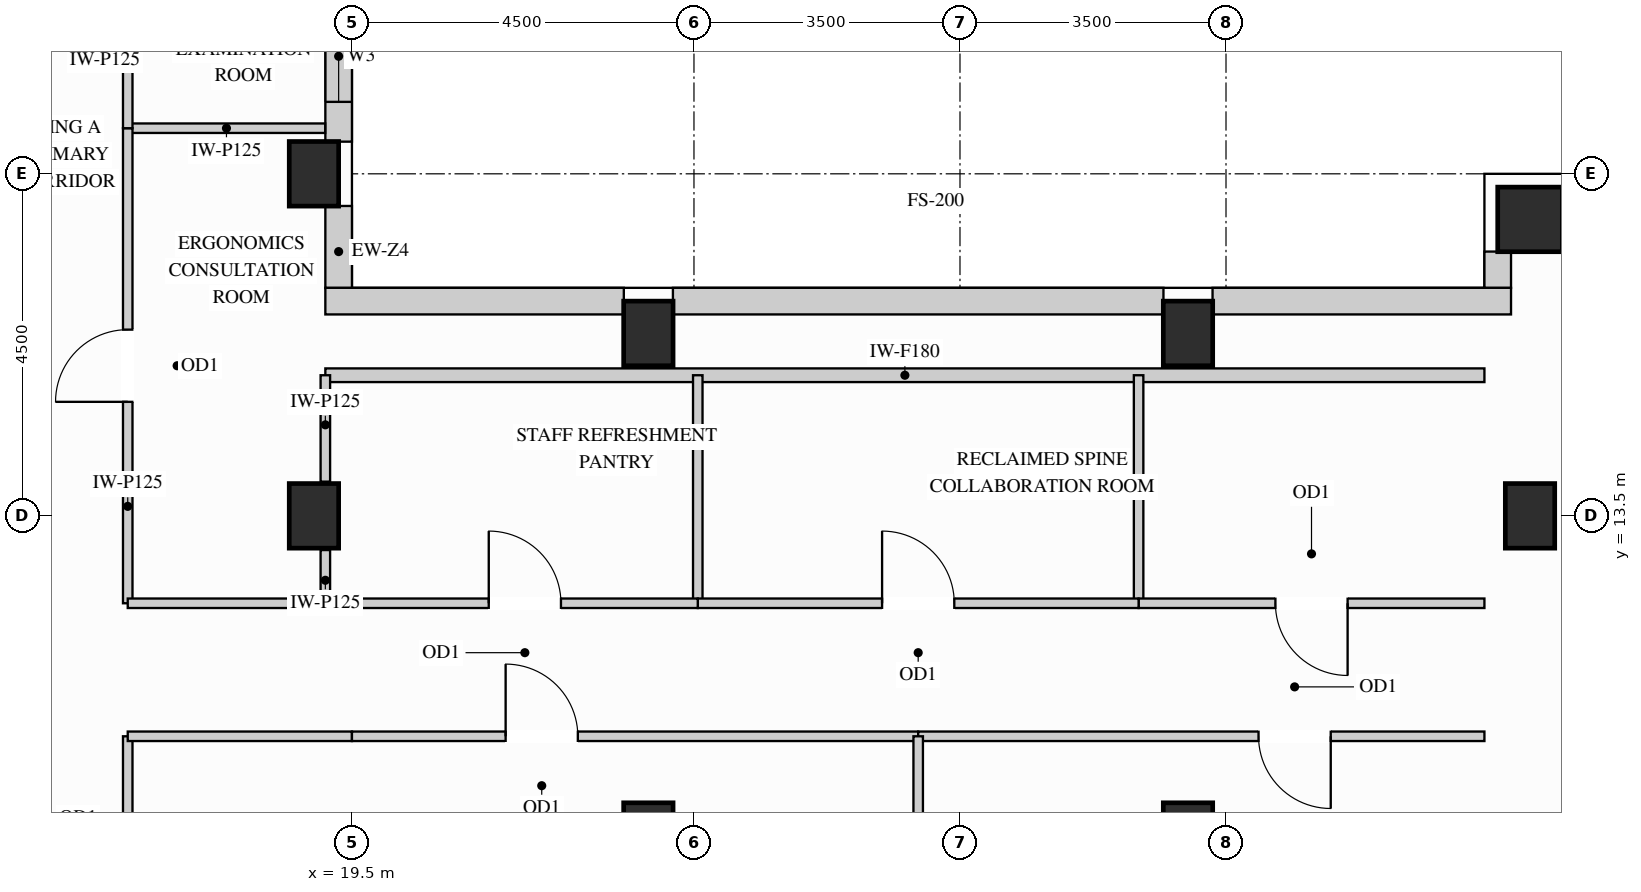
"""IFC4 building model, lengths in metres.
Left out: names, types, materials, properties, quantities, classifications, styles, units other than length and angle.
Written with IfcOpenShell. Run it as: python <this file> out.ifc"""

import sys

from ifc_helpers import new_model, si_unit, direction, frame, frame_2d, origin, origin_2d, place, context, subcontext, project, spatial, rectangle, extrude, source, transform, mapped, element, fill, save


model = new_model("IFC4")
c1 = context("Model", 3, precision=1e-05, world=origin(), true_north=direction((0.0, 1.0)))
c2 = subcontext(c1, "Body", "Model", "MODEL_VIEW")
j1 = project(units=[si_unit("LENGTHUNIT", "METRE"), si_unit("PLANEANGLEUNIT", "RADIAN")], contexts=[c1])
p1 = place(None, origin())
s1 = spatial("IfcSite", under=j1, at=p1, CompositionType="ELEMENT")
p2 = place(p1, origin())
s2 = spatial("IfcBuilding", under=s1, at=p2, CompositionType="ELEMENT")
p3 = place(p2, frame((0.0, 0.0, 248.4)))
s3 = spatial("IfcBuildingStorey", under=s2, at=p3, CompositionType="ELEMENT", Elevation=248.4)
m1 = source(origin(), c2, "Body", "SweptSolid", [
    extrude(rectangle(XDim=0.65, YDim=0.85, at=origin_2d()), origin(), (0.0, 0.0, 1.0), 3.4),
])
for number, where, z_axis, x_axis in (
    (1, (19.0, 13.5, 0.0), (0.0, 0.0, 1.0), (1.0, 0.0, 0.0)),
    (2, (19.0, 18.0, 0.0), (0.0, 0.0, 1.0), (1.0, 0.0, 0.0)),
    (3, (35.0, 13.5, 0.0), (0.0, 0.0, 1.0), (1.0, 0.0, 0.0)),
    (4, (23.4, 15.9, 0.0), (0.0, 0.0, 1.0), (1.0, 0.0, 0.0)),
    (5, (23.4, 9.3, 0.0), (0.0, 0.0, 1.0), (1.0, 0.0, 0.0)),
    (6, (30.5, 15.9, 0.0), (0.0, 0.0, 1.0), (1.0, 0.0, 0.0)),
    (7, (30.5, 9.3, 0.0), (0.0, 0.0, 1.0), (1.0, 0.0, 0.0)),
):
    element("IfcColumn", number, at=place(p3, frame(where, z_axis=z_axis, x_axis=x_axis)), inside=s3, PredefinedType="COLUMN", context=c2, shape_type="MappedRepresentation", body=[
        mapped(m1, transform((0.0, 0.0, 0.0), x_axis=(1.0, 0.0, 0.0), y_axis=(0.0, 1.0, 0.0), z_axis=(0.0, 0.0, 1.0))),
    ])
m2 = source(origin(), c2, "Body", "SweptSolid", [
    extrude(rectangle(XDim=0.85, YDim=0.85, at=origin_2d()), origin(), (0.0, 0.0, 1.0), 3.4),
])
p4 = place(p3, frame((35.0, 17.4, 0.0), z_axis=(0.0, 0.0, 1.0), x_axis=(1.0, 0.0, 0.0)))
e8 = element("IfcColumn", 8, at=p4, inside=s3, PredefinedType="COLUMN", context=c2, shape_type="MappedRepresentation", body=[
    mapped(m2, transform((0.0, 0.0, 0.0), x_axis=(1.0, 0.0, 0.0), y_axis=(0.0, 1.0, 0.0), z_axis=(0.0, 0.0, 1.0))),
])
m3 = source(origin(), c2, "Body", "SweptSolid", [
    extrude(rectangle(XDim=1.079, YDim=0.35, at=frame_2d((0.54, 0.0))), origin(), (0.0, 0.0, 1.0), 2.619),
])
p5 = place(p3, frame((19.325, 16.498, 0.0), z_axis=(0.0, 0.0, 1.0), x_axis=(0.0, 1.0, 0.0)))
e9 = element("IfcWall", 9, at=p5, inside=s3, PredefinedType="SOLIDWALL", context=c2, shape_type="MappedRepresentation", body=[
    mapped(m3, transform((0.0, 0.0, 0.0), x_axis=(1.0, 0.0, 0.0), y_axis=(0.0, 1.0, 0.0), z_axis=(0.0, 0.0, 1.0))),
])
p6 = place(p3, frame((19.325, 18.423, 0.0), z_axis=(0.0, 0.0, 1.0), x_axis=(0.0, 1.0, 0.0)))
e10 = element("IfcWall", 10, at=p6, inside=s3, PredefinedType="SOLIDWALL", context=c2, shape_type="SweptSolid", body=[
    extrude(rectangle(XDim=3.654, YDim=0.35, at=frame_2d((1.827, 0.0))), origin(), (0.0, 0.0, 1.0), 2.619),
])
p7 = place(p6, frame((0.523, 0.0, 0.78)))
e11 = element("IfcOpeningElement", 11, at=p7, cuts=e10, PredefinedType="OPENING", context=c2, shape_type="SweptSolid", body=[
    extrude(rectangle(XDim=1.2, YDim=1.659, at=frame_2d((0.6, 0.83))), frame((0.0, 0.185, 0.0), z_axis=(0.0, -1.0, 0.0), x_axis=(1.0, 0.0, 0.0)), (0.0, 0.0, 1.0), 0.37),
])
m4 = source(origin(), c2, "Body", "SweptSolid", [
    extrude(rectangle(XDim=0.479, YDim=0.35, at=frame_2d((0.24, 0.0))), origin(), (0.0, 0.0, 1.0), 3.385),
])
p8 = place(p3, frame((34.575, 16.977, 0.0), z_axis=(0.0, 0.0, 1.0), x_axis=(0.0, -1.0, 0.0)))
e12 = element("IfcWall", 12, at=p8, inside=s3, PredefinedType="SOLIDWALL", context=c2, shape_type="MappedRepresentation", body=[
    mapped(m4, transform((0.0, 0.0, 0.0), x_axis=(1.0, 0.0, 0.0), y_axis=(0.0, 1.0, 0.0), z_axis=(0.0, 0.0, 1.0))),
])
m5 = source(origin(), c2, "Body", "SweptSolid", [
    extrude(rectangle(XDim=3.927, YDim=0.35, at=frame_2d((1.963, 0.0))), origin(), (0.0, 0.0, 1.0), 3.385),
])
p9 = place(p3, frame((34.75, 16.325, 0.0), z_axis=(0.0, 0.0, 1.0), x_axis=(-1.0, 0.0, 0.0)))
e13 = element("IfcWall", 13, at=p9, inside=s3, PredefinedType="SOLIDWALL", context=c2, shape_type="MappedRepresentation", body=[
    mapped(m5, transform((0.0, 0.0, 0.0), x_axis=(1.0, 0.0, 0.0), y_axis=(0.0, 1.0, 0.0), z_axis=(0.0, 0.0, 1.0))),
])
m6 = source(origin(), c2, "Body", "SweptSolid", [
    extrude(rectangle(XDim=6.454, YDim=0.35, at=frame_2d((3.227, 0.0))), origin(), (0.0, 0.0, 1.0), 3.385),
])
p10 = place(p3, frame((30.177, 16.325, 0.0), z_axis=(0.0, 0.0, 1.0), x_axis=(-1.0, 0.0, 0.0)))
e14 = element("IfcWall", 14, at=p10, inside=s3, PredefinedType="SOLIDWALL", context=c2, shape_type="MappedRepresentation", body=[
    mapped(m6, transform((0.0, 0.0, 0.0), x_axis=(1.0, 0.0, 0.0), y_axis=(0.0, 1.0, 0.0), z_axis=(0.0, 0.0, 1.0))),
])
p11 = place(p3, frame((23.077, 16.325, 0.0), z_axis=(0.0, 0.0, 1.0), x_axis=(-1.0, 0.0, 0.0)))
e15 = element("IfcWall", 15, at=p11, inside=s3, PredefinedType="SOLIDWALL", context=c2, shape_type="MappedRepresentation", body=[
    mapped(m5, transform((0.0, 0.0, 0.0), x_axis=(1.0, 0.0, 0.0), y_axis=(0.0, 1.0, 0.0), z_axis=(0.0, 0.0, 1.0))),
])
m7 = source(origin(), c2, "Body", "SweptSolid", [
    extrude(rectangle(XDim=15.25, YDim=0.18, at=frame_2d((7.625, 0.0))), origin(), (0.0, 0.0, 1.0), 3.385),
])
p12 = place(p3, frame((19.15, 15.35, 0.0), z_axis=(0.0, 0.0, 1.0), x_axis=(1.0, 0.0, 0.0)))
e16 = element("IfcWall", 16, at=p12, inside=s3, PredefinedType="PARTITIONING", context=c2, shape_type="MappedRepresentation", body=[
    mapped(m7, transform((0.0, 0.0, 0.0), x_axis=(1.0, 0.0, 0.0), y_axis=(0.0, 1.0, 0.0), z_axis=(0.0, 0.0, 1.0))),
])
m8 = source(origin(), c2, "Body", "SweptSolid", [
    extrude(rectangle(XDim=2.598, YDim=0.125, at=frame_2d((1.299, 0.0))), origin(), (0.0, 0.0, 1.0), 3.385),
])
p13 = place(p3, frame((16.55, 18.6, 0.0), z_axis=(0.0, 0.0, 1.0), x_axis=(1.0, 0.0, 0.0)))
e17 = element("IfcWall", 17, at=p13, inside=s3, PredefinedType="PARTITIONING", context=c2, shape_type="MappedRepresentation", body=[
    mapped(m8, transform((0.0, 0.0, 0.0), x_axis=(1.0, 0.0, 0.0), y_axis=(0.0, 1.0, 0.0), z_axis=(0.0, 0.0, 1.0))),
])
m9 = source(origin(), c2, "Body", "SweptSolid", [
    extrude(rectangle(XDim=0.7, YDim=0.125, at=frame_2d((0.35, 0.0))), origin(), (0.0, 0.0, 1.0), 2.773),
])
p14 = place(p3, frame((19.15, 12.35, 0.0), z_axis=(0.0, 0.0, 1.0), x_axis=(0.0, 1.0, 0.0)))
e18 = element("IfcWall", 18, at=p14, inside=s3, PredefinedType="PARTITIONING", context=c2, shape_type="MappedRepresentation", body=[
    mapped(m9, transform((0.0, 0.0, 0.0), x_axis=(1.0, 0.0, 0.0), y_axis=(0.0, 1.0, 0.0), z_axis=(0.0, 0.0, 1.0))),
])
m10 = source(origin(), c2, "Body", "SweptSolid", [
    extrude(rectangle(XDim=1.4, YDim=0.125, at=frame_2d((0.7, 0.0))), origin(), (0.0, 0.0, 1.0), 2.619),
])
p15 = place(p3, frame((19.15, 13.95, 0.0), z_axis=(0.0, 0.0, 1.0), x_axis=(0.0, 1.0, 0.0)))
e19 = element("IfcWall", 19, at=p15, inside=s3, PredefinedType="PARTITIONING", context=c2, shape_type="MappedRepresentation", body=[
    mapped(m10, transform((0.0, 0.0, 0.0), x_axis=(1.0, 0.0, 0.0), y_axis=(0.0, 1.0, 0.0), z_axis=(0.0, 0.0, 1.0))),
])
p16 = place(p3, frame((16.55, 12.35, 0.0), z_axis=(0.0, 0.0, 1.0), x_axis=(0.0, 1.0, 0.0)))
e20 = element("IfcWall", 20, at=p16, inside=s3, PredefinedType="PARTITIONING", context=c2, shape_type="SweptSolid", body=[
    extrude(rectangle(XDim=6.25, YDim=0.125, at=frame_2d((3.125, 0.0))), origin(), (0.0, 0.0, 1.0), 3.385),
])
p17 = place(p16, frame((2.65, 0.0, 0.0)))
e21 = element("IfcOpeningElement", 21, at=p17, cuts=e20, PredefinedType="OPENING", context=c2, shape_type="SweptSolid", body=[
    extrude(rectangle(XDim=0.95, YDim=2.15, at=frame_2d((0.475, 1.075))), frame((0.0, 0.073, 0.0), z_axis=(0.0, -1.0, 0.0), x_axis=(1.0, 0.0, 0.0)), (0.0, 0.0, 1.0), 0.145),
])
p18 = place(p3, frame((16.55, 18.6, 0.0), z_axis=(0.0, 0.0, 1.0), x_axis=(0.0, 1.0, 0.0)))
e22 = element("IfcWall", 22, at=p18, inside=s3, PredefinedType="PARTITIONING", context=c2, shape_type="SweptSolid", body=[
    extrude(rectangle(XDim=4.75, YDim=0.125, at=frame_2d((2.375, 0.0))), origin(), (0.0, 0.0, 1.0), 3.385),
])
p19 = place(p18, frame((1.9, 0.0, 0.0)))
e23 = element("IfcOpeningElement", 23, at=p19, cuts=e22, PredefinedType="OPENING", context=c2, shape_type="SweptSolid", body=[
    extrude(rectangle(XDim=0.95, YDim=2.15, at=frame_2d((0.475, 1.075))), frame((0.0, 0.073, 0.0), z_axis=(0.0, -1.0, 0.0), x_axis=(1.0, 0.0, 0.0)), (0.0, 0.0, 1.0), 0.145),
])
p20 = place(p3, frame((16.55, 6.25, 0.0), z_axis=(0.0, 0.0, 1.0), x_axis=(0.0, 1.0, 0.0)))
e24 = element("IfcWall", 24, at=p20, inside=s3, PredefinedType="PARTITIONING", context=c2, shape_type="SweptSolid", body=[
    extrude(rectangle(XDim=4.35, YDim=0.125, at=frame_2d((2.175, 0.0))), origin(), (0.0, 0.0, 1.0), 3.385),
])
p21 = place(p20, frame((1.7, 0.0, 0.0)))
e25 = element("IfcOpeningElement", 25, at=p21, cuts=e24, PredefinedType="OPENING", context=c2, shape_type="SweptSolid", body=[
    extrude(rectangle(XDim=0.95, YDim=2.15, at=frame_2d((0.475, 1.075))), frame((0.0, 0.073, 0.0), z_axis=(0.0, -1.0, 0.0), x_axis=(1.0, 0.0, 0.0)), (0.0, 0.0, 1.0), 0.145),
])
m11 = source(origin(), c2, "Body", "SweptSolid", [
    extrude(rectangle(XDim=3.0, YDim=0.125, at=frame_2d((1.5, 0.0))), origin(), (0.0, 0.0, 1.0), 3.385),
])
for number, where, z_axis, x_axis in (
    (26, (24.05, 12.35, 0.0), (0.0, 0.0, 1.0), (0.0, 1.0, 0.0)),
    (27, (29.85, 12.35, 0.0), (0.0, 0.0, 1.0), (0.0, 1.0, 0.0)),
):
    element("IfcWall", number, at=place(p3, frame(where, z_axis=z_axis, x_axis=x_axis)), inside=s3, PredefinedType="PARTITIONING", context=c2, shape_type="MappedRepresentation", body=[
        mapped(m11, transform((0.0, 0.0, 0.0), x_axis=(1.0, 0.0, 0.0), y_axis=(0.0, 1.0, 0.0), z_axis=(0.0, 0.0, 1.0))),
    ])
p22 = place(p3, frame((29.85, 12.35, 0.0), z_axis=(0.0, 0.0, 1.0), x_axis=(1.0, 0.0, 0.0)))
e28 = element("IfcWall", 28, at=p22, inside=s3, PredefinedType="PARTITIONING", context=c2, shape_type="SweptSolid", body=[
    extrude(rectangle(XDim=4.55, YDim=0.125, at=frame_2d((2.275, 0.0))), origin(), (0.0, 0.0, 1.0), 3.385),
])
p23 = place(p22, frame((1.8, 0.0, 0.0)))
e29 = element("IfcOpeningElement", 29, at=p23, cuts=e28, PredefinedType="OPENING", context=c2, shape_type="SweptSolid", body=[
    extrude(rectangle(XDim=0.95, YDim=2.15, at=frame_2d((0.475, 1.075))), frame((0.0, 0.073, 0.0), z_axis=(0.0, -1.0, 0.0), x_axis=(1.0, 0.0, 0.0)), (0.0, 0.0, 1.0), 0.145),
])
p24 = place(p3, frame((24.05, 12.35, 0.0), z_axis=(0.0, 0.0, 1.0), x_axis=(1.0, 0.0, 0.0)))
e30 = element("IfcWall", 30, at=p24, inside=s3, PredefinedType="PARTITIONING", context=c2, shape_type="SweptSolid", body=[
    extrude(rectangle(XDim=5.8, YDim=0.125, at=frame_2d((2.9, 0.0))), origin(), (0.0, 0.0, 1.0), 3.385),
])
p25 = place(p24, frame((2.425, 0.0, 0.0)))
e31 = element("IfcOpeningElement", 31, at=p25, cuts=e30, PredefinedType="OPENING", context=c2, shape_type="SweptSolid", body=[
    extrude(rectangle(XDim=0.95, YDim=2.15, at=frame_2d((0.475, 1.075))), frame((0.0, 0.073, 0.0), z_axis=(0.0, -1.0, 0.0), x_axis=(1.0, 0.0, 0.0)), (0.0, 0.0, 1.0), 0.145),
])
m12 = source(origin(), c2, "Body", "SweptSolid", [
    extrude(rectangle(XDim=2.95, YDim=0.125, at=frame_2d((1.475, 0.0))), origin(), (0.0, 0.0, 1.0), 3.385),
])
p26 = place(p3, frame((16.55, 12.35, 0.0), z_axis=(0.0, 0.0, 1.0), x_axis=(1.0, 0.0, 0.0)))
e32 = element("IfcWall", 32, at=p26, inside=s3, PredefinedType="PARTITIONING", context=c2, shape_type="MappedRepresentation", body=[
    mapped(m12, transform((0.0, 0.0, 0.0), x_axis=(1.0, 0.0, 0.0), y_axis=(0.0, 1.0, 0.0), z_axis=(0.0, 0.0, 1.0))),
])
p27 = place(p3, frame((19.5, 12.35, 0.0), z_axis=(0.0, 0.0, 1.0), x_axis=(1.0, 0.0, 0.0)))
e33 = element("IfcWall", 33, at=p27, inside=s3, PredefinedType="PARTITIONING", context=c2, shape_type="SweptSolid", body=[
    extrude(rectangle(XDim=4.55, YDim=0.125, at=frame_2d((2.275, 0.0))), origin(), (0.0, 0.0, 1.0), 3.385),
])
p28 = place(p27, frame((1.8, 0.0, 0.0)))
e34 = element("IfcOpeningElement", 34, at=p28, cuts=e33, PredefinedType="OPENING", context=c2, shape_type="SweptSolid", body=[
    extrude(rectangle(XDim=0.95, YDim=2.15, at=frame_2d((0.475, 1.075))), frame((0.0, 0.073, 0.0), z_axis=(0.0, -1.0, 0.0), x_axis=(1.0, 0.0, 0.0)), (0.0, 0.0, 1.0), 0.145),
])
p29 = place(p3, frame((16.55, 10.6, 0.0), z_axis=(0.0, 0.0, 1.0), x_axis=(1.0, 0.0, 0.0)))
e35 = element("IfcWall", 35, at=p29, inside=s3, PredefinedType="PARTITIONING", context=c2, shape_type="MappedRepresentation", body=[
    mapped(m12, transform((0.0, 0.0, 0.0), x_axis=(1.0, 0.0, 0.0), y_axis=(0.0, 1.0, 0.0), z_axis=(0.0, 0.0, 1.0))),
])
p30 = place(p3, frame((19.5, 10.6, 0.0), z_axis=(0.0, 0.0, 1.0), x_axis=(1.0, 0.0, 0.0)))
e36 = element("IfcWall", 36, at=p30, inside=s3, PredefinedType="PARTITIONING", context=c2, shape_type="SweptSolid", body=[
    extrude(rectangle(XDim=7.45, YDim=0.125, at=frame_2d((3.725, 0.0))), origin(), (0.0, 0.0, 1.0), 3.385),
])
p31 = place(p30, frame((2.022, 0.0, 0.0)))
e37 = element("IfcOpeningElement", 37, at=p31, cuts=e36, PredefinedType="OPENING", context=c2, shape_type="SweptSolid", body=[
    extrude(rectangle(XDim=0.95, YDim=2.15, at=frame_2d((0.475, 1.075))), frame((0.0, 0.073, 0.0), z_axis=(0.0, -1.0, 0.0), x_axis=(1.0, 0.0, 0.0)), (0.0, 0.0, 1.0), 0.145),
])
p32 = place(p3, frame((26.95, 10.6, 0.0), z_axis=(0.0, 0.0, 1.0), x_axis=(1.0, 0.0, 0.0)))
e38 = element("IfcWall", 38, at=p32, inside=s3, PredefinedType="PARTITIONING", context=c2, shape_type="SweptSolid", body=[
    extrude(rectangle(XDim=7.45, YDim=0.125, at=frame_2d((3.725, 0.0))), origin(), (0.0, 0.0, 1.0), 3.385),
])
p33 = place(p32, frame((4.478, 0.0, 0.0)))
e39 = element("IfcOpeningElement", 39, at=p33, cuts=e38, PredefinedType="OPENING", context=c2, shape_type="SweptSolid", body=[
    extrude(rectangle(XDim=0.95, YDim=2.15, at=frame_2d((0.475, 1.075))), frame((0.0, 0.073, 0.0), z_axis=(0.0, -1.0, 0.0), x_axis=(1.0, 0.0, 0.0)), (0.0, 0.0, 1.0), 0.145),
])
m13 = source(origin(), c2, "Body", "SweptSolid", [
    extrude(rectangle(XDim=10.25, YDim=0.125, at=frame_2d((5.125, 0.0))), origin(), (0.0, 0.0, 1.0), 3.385),
])
p34 = place(p3, frame((26.95, 0.35, 0.0), z_axis=(0.0, 0.0, 1.0), x_axis=(0.0, 1.0, 0.0)))
e40 = element("IfcWall", 40, at=p34, inside=s3, PredefinedType="PARTITIONING", context=c2, shape_type="MappedRepresentation", body=[
    mapped(m13, transform((0.0, 0.0, 0.0), x_axis=(1.0, 0.0, 0.0), y_axis=(0.0, 1.0, 0.0), z_axis=(0.0, 0.0, 1.0))),
])
m14 = source(origin(), c2, "Body", "SweptSolid", [
    extrude(rectangle(XDim=0.95, YDim=2.15, at=frame_2d((0.475, 1.075))), frame((0.0, 0.025, 0.0), z_axis=(0.0, -1.0, 0.0), x_axis=(1.0, 0.0, 0.0)), (0.0, 0.0, 1.0), 0.05),
])
p35 = place(p17, origin())
e41 = element("IfcDoor", 41, at=p35, inside=s3, OperationType="SINGLE_SWING_LEFT", PredefinedType="DOOR", context=c2, shape_type="MappedRepresentation", body=[
    mapped(m14, transform((0.0, 0.0, 0.0), x_axis=(1.0, 0.0, 0.0), y_axis=(0.0, 1.0, 0.0), z_axis=(0.0, 0.0, 1.0))),
])
fill(e21, e41)
p36 = place(p25, origin())
e42 = element("IfcDoor", 42, at=p36, inside=s3, OperationType="SINGLE_SWING_LEFT", PredefinedType="DOOR", context=c2, shape_type="MappedRepresentation", body=[
    mapped(m14, transform((0.0, 0.0, 0.0), x_axis=(1.0, 0.0, 0.0), y_axis=(0.0, 1.0, 0.0), z_axis=(0.0, 0.0, 1.0))),
])
fill(e31, e42)
p37 = place(p28, origin())
e43 = element("IfcDoor", 43, at=p37, inside=s3, OperationType="SINGLE_SWING_LEFT", PredefinedType="DOOR", context=c2, shape_type="MappedRepresentation", body=[
    mapped(m14, transform((0.0, 0.0, 0.0), x_axis=(1.0, 0.0, 0.0), y_axis=(0.0, 1.0, 0.0), z_axis=(0.0, 0.0, 1.0))),
])
fill(e34, e43)
p38 = place(p23, origin())
e44 = element("IfcDoor", 44, at=p38, inside=s3, OperationType="SINGLE_SWING_RIGHT", PredefinedType="DOOR", context=c2, shape_type="MappedRepresentation", body=[
    mapped(m14, transform((0.0, 0.0, 0.0), x_axis=(1.0, 0.0, 0.0), y_axis=(0.0, 1.0, 0.0), z_axis=(0.0, 0.0, 1.0))),
])
fill(e29, e44)
p39 = place(p31, origin())
e45 = element("IfcDoor", 45, at=p39, inside=s3, OperationType="SINGLE_SWING_LEFT", PredefinedType="DOOR", context=c2, shape_type="MappedRepresentation", body=[
    mapped(m14, transform((0.0, 0.0, 0.0), x_axis=(1.0, 0.0, 0.0), y_axis=(0.0, 1.0, 0.0), z_axis=(0.0, 0.0, 1.0))),
])
fill(e37, e45)
p40 = place(p33, origin())
e46 = element("IfcDoor", 46, at=p40, inside=s3, OperationType="SINGLE_SWING_RIGHT", PredefinedType="DOOR", context=c2, shape_type="MappedRepresentation", body=[
    mapped(m14, transform((0.0, 0.0, 0.0), x_axis=(1.0, 0.0, 0.0), y_axis=(0.0, 1.0, 0.0), z_axis=(0.0, 0.0, 1.0))),
])
fill(e39, e46)
m15 = source(origin(), c2, "Body", "SweptSolid", [
    extrude(rectangle(XDim=1.2, YDim=1.659, at=frame_2d((0.6, 0.83))), frame((0.0, 0.03, 0.0), z_axis=(0.0, -1.0, 0.0), x_axis=(1.0, 0.0, 0.0)), (0.0, 0.0, 1.0), 0.06),
])
p41 = place(p7, origin())
e47 = element("IfcWindow", 47, at=p41, inside=s3, PartitioningType="SINGLE_PANEL", PredefinedType="WINDOW", context=c2, shape_type="MappedRepresentation", body=[
    mapped(m15, transform((0.0, 0.0, 0.0), x_axis=(1.0, 0.0, 0.0), y_axis=(0.0, 1.0, 0.0), z_axis=(0.0, 0.0, 1.0))),
])
fill(e11, e47)
save(model, sys.argv[1])
